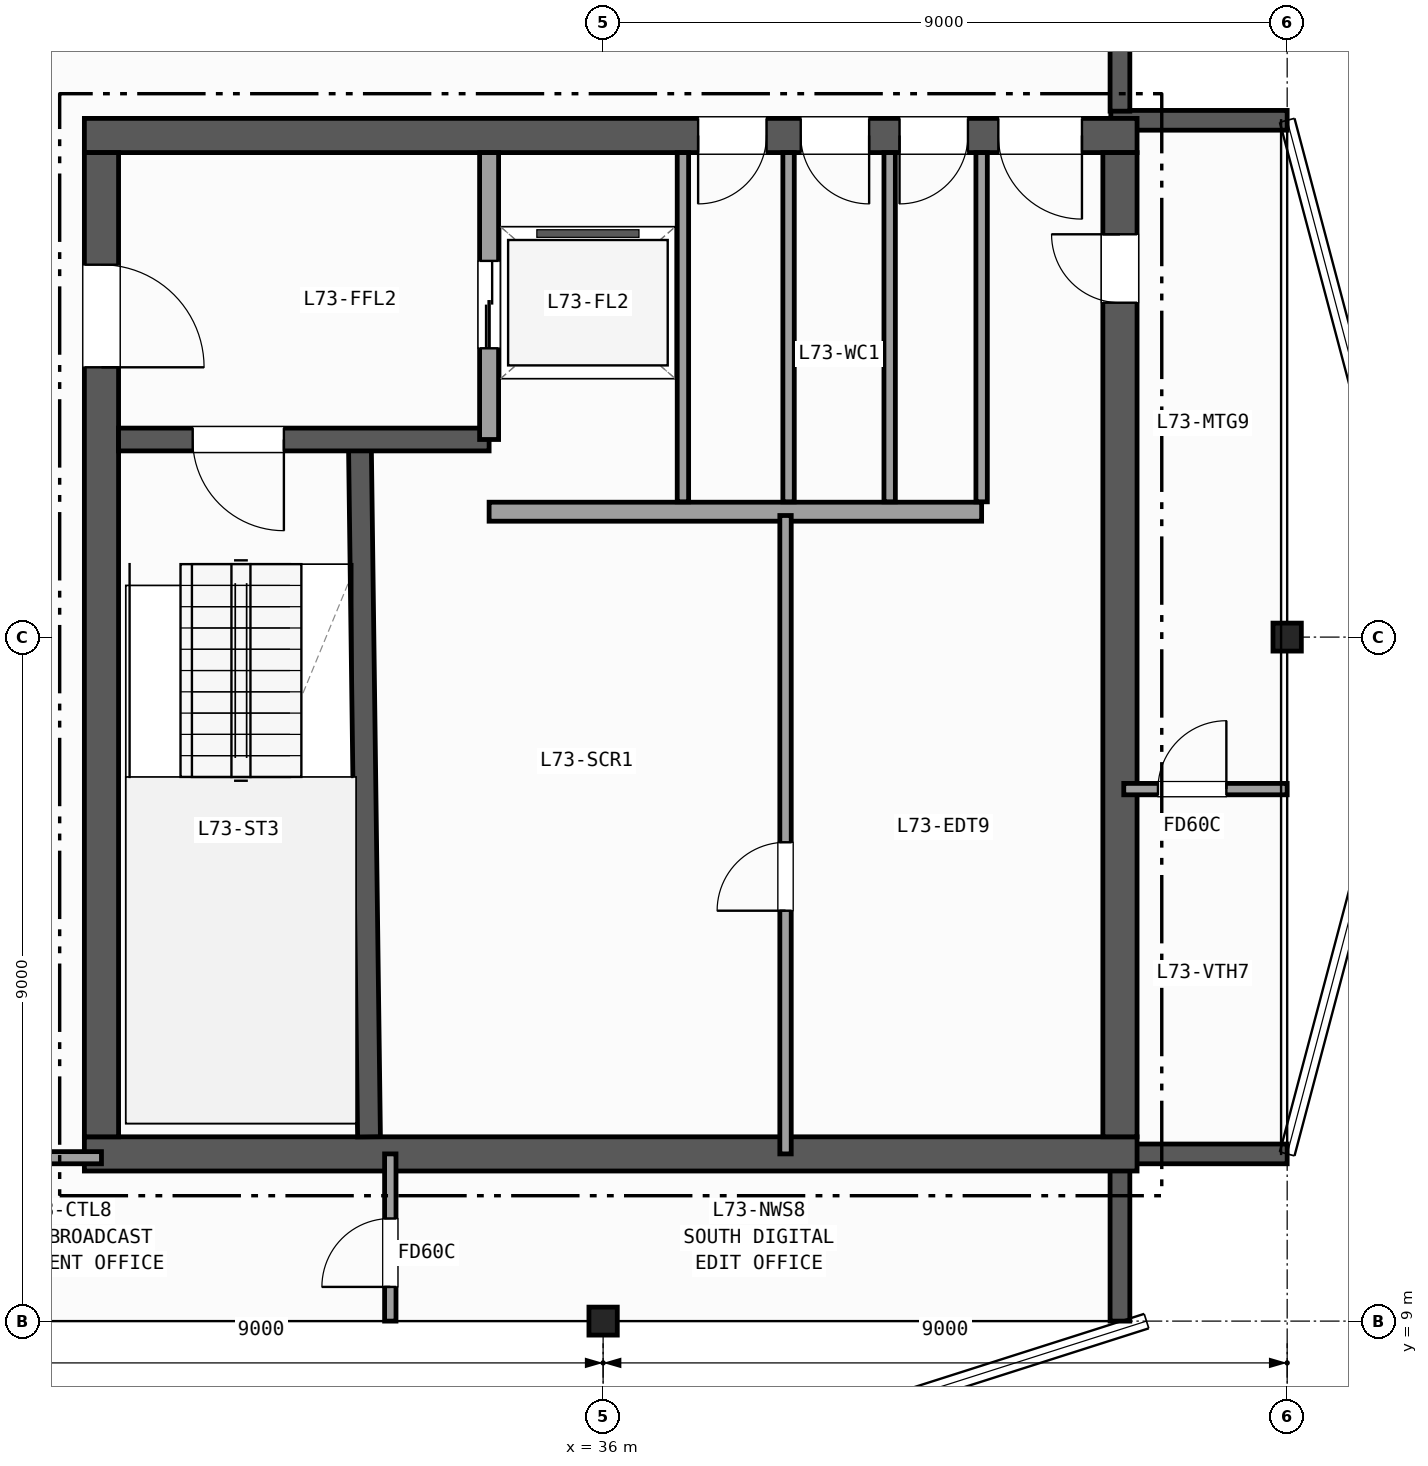
"""IFC4 building model, lengths in metres.
Left out: names, types, materials, properties, quantities, classifications, styles, units other than length and angle.
Written with IfcOpenShell. Run it as: python <this file> out.ifc"""

import sys

from ifc_helpers import new_model, si_unit, direction, frame, frame_2d, origin, origin_2d, place, context, subcontext, project, spatial, rectangle, i_section, extrude, element, fill, save


model = new_model("IFC4")
c1 = context("Model", 3, precision=1e-05, world=origin(), true_north=direction((0.0, 1.0)))
c2 = subcontext(c1, "Body", "Model", "MODEL_VIEW")
j1 = project(units=[si_unit("LENGTHUNIT", "METRE"), si_unit("PLANEANGLEUNIT", "RADIAN")], contexts=[c1])
p1 = place(None, origin())
s1 = spatial("IfcSite", under=j1, at=p1, CompositionType="ELEMENT")
p2 = place(p1, origin())
s2 = spatial("IfcBuilding", under=s1, at=p2, CompositionType="ELEMENT")
p3 = place(p2, frame((0.0, 0.0, 290.0)))
s3 = spatial("IfcBuildingStorey", under=s2, at=p3, CompositionType="ELEMENT", Elevation=290.0)
for number, where, z_axis, x_axis in (
    (1, (36.0, 9.0, 0.0), (0.0, 0.0, 1.0), (1.0, 0.0, 0.0)),
    (2, (45.0, 18.0, 0.0), (0.0, 0.0, 1.0), (1.0, 0.0, 0.0)),
):
    element("IfcColumn", number, at=place(p3, frame(where, z_axis=z_axis, x_axis=x_axis)), inside=s3, PredefinedType="COLUMN", context=c2, shape_type="SweptSolid", body=[
        extrude(i_section(OverallWidth=0.373, OverallDepth=0.368, WebThickness=0.015, FlangeThickness=0.024, FilletRadius=0.015, at=origin_2d()), origin(), (0.0, 0.0, 1.0), 3.7),
    ])
p4 = place(p3, frame((42.8, 9.0, 0.0), z_axis=(0.0, 0.0, 1.0), x_axis=(0.0, 1.0, 0.0)))
e3 = element("IfcWall", 3, at=p4, inside=s3, PredefinedType="SOLIDWALL", context=c2, shape_type="SweptSolid", body=[
    extrude(rectangle(XDim=2.08, YDim=0.26, at=frame_2d((1.04, 0.0))), origin(), (0.0, 0.0, 1.0), 3.42),
])
for number, where, z_axis, x_axis in (
    (4, (42.68, 11.2, 0.0), (0.0, 0.0, 1.0), (1.0, 0.0, 0.0)),
    (5, (45.0, 24.8, 0.0), (0.0, 0.0, 1.0), (-1.0, 0.0, 0.0)),
):
    element("IfcWall", number, at=place(p3, frame(where, z_axis=z_axis, x_axis=x_axis)), inside=s3, PredefinedType="SOLIDWALL", context=c2, shape_type="SweptSolid", body=[
        extrude(rectangle(XDim=2.32, YDim=0.26, at=frame_2d((1.16, 0.0))), origin(), (0.0, 0.0, 1.0), 3.42),
    ])
p5 = place(p3, frame((42.8, 24.92, 0.0), z_axis=(0.0, 0.0, 1.0), x_axis=(0.0, 1.0, 0.0)))
e6 = element("IfcWall", 6, at=p5, inside=s3, PredefinedType="SOLIDWALL", context=c2, shape_type="SweptSolid", body=[
    extrude(rectangle(XDim=2.08, YDim=0.26, at=frame_2d((1.04, 0.0))), origin(), (0.0, 0.0, 1.0), 3.42),
])
p6 = place(p3, frame((29.175, 11.2, 0.0), z_axis=(0.0, 0.0, 1.0), x_axis=(1.0, 0.0, 0.0)))
e7 = element("IfcWall", 7, at=p6, inside=s3, PredefinedType="SHEAR", context=c2, shape_type="SweptSolid", body=[
    extrude(rectangle(XDim=13.85, YDim=0.45, at=frame_2d((6.925, 0.0))), origin(), (0.0, 0.0, 1.0), 3.42),
])
p7 = place(p3, frame((43.025, 24.6, 0.0), z_axis=(0.0, 0.0, 1.0), x_axis=(-1.0, 0.0, 0.0)))
e8 = element("IfcWall", 8, at=p7, inside=s3, PredefinedType="SHEAR", context=c2, shape_type="SweptSolid", body=[
    extrude(rectangle(XDim=13.85, YDim=0.45, at=frame_2d((6.925, 0.0))), origin(), (0.0, 0.0, 1.0), 3.42),
])
p8 = place(p7, frame((0.725, 0.0, 0.0)))
e9 = element("IfcOpeningElement", 9, at=p8, cuts=e8, PredefinedType="OPENING", context=c2, shape_type="SweptSolid", body=[
    extrude(rectangle(XDim=1.1, YDim=2.15, at=frame_2d((0.55, 1.075))), frame((0.0, 0.235, 0.0), z_axis=(0.0, -1.0, 0.0), x_axis=(1.0, 0.0, 0.0)), (0.0, 0.0, 1.0), 0.47),
])
p9 = place(p7, frame((2.225, 0.0, 0.0)))
e10 = element("IfcOpeningElement", 10, at=p9, cuts=e8, PredefinedType="OPENING", context=c2, shape_type="SweptSolid", body=[
    extrude(rectangle(XDim=0.9, YDim=2.1, at=frame_2d((0.45, 1.05))), frame((0.0, 0.235, 0.0), z_axis=(0.0, -1.0, 0.0), x_axis=(1.0, 0.0, 0.0)), (0.0, 0.0, 1.0), 0.47),
])
p10 = place(p7, frame((3.525, 0.0, 0.0)))
e11 = element("IfcOpeningElement", 11, at=p10, cuts=e8, PredefinedType="OPENING", context=c2, shape_type="SweptSolid", body=[
    extrude(rectangle(XDim=0.9, YDim=2.1, at=frame_2d((0.45, 1.05))), frame((0.0, 0.235, 0.0), z_axis=(0.0, -1.0, 0.0), x_axis=(1.0, 0.0, 0.0)), (0.0, 0.0, 1.0), 0.47),
])
p11 = place(p7, frame((4.875, 0.0, 0.0)))
e12 = element("IfcOpeningElement", 12, at=p11, cuts=e8, PredefinedType="OPENING", context=c2, shape_type="SweptSolid", body=[
    extrude(rectangle(XDim=0.9, YDim=2.1, at=frame_2d((0.45, 1.05))), frame((0.0, 0.235, 0.0), z_axis=(0.0, -1.0, 0.0), x_axis=(1.0, 0.0, 0.0)), (0.0, 0.0, 1.0), 0.47),
])
p12 = place(p3, frame((29.4, 24.375, 0.0), z_axis=(0.0, 0.0, 1.0), x_axis=(0.0, -1.0, 0.0)))
e13 = element("IfcWall", 13, at=p12, inside=s3, PredefinedType="SHEAR", context=c2, shape_type="SweptSolid", body=[
    extrude(rectangle(XDim=12.95, YDim=0.45, at=frame_2d((6.475, 0.0))), origin(), (0.0, 0.0, 1.0), 3.42),
])
p13 = place(p12, frame((1.475, 0.0, 0.0)))
e14 = element("IfcOpeningElement", 14, at=p13, cuts=e13, PredefinedType="OPENING", context=c2, shape_type="SweptSolid", body=[
    extrude(rectangle(XDim=1.35, YDim=2.15, at=frame_2d((0.675, 1.075))), frame((0.0, 0.235, 0.0), z_axis=(0.0, -1.0, 0.0), x_axis=(1.0, 0.0, 0.0)), (0.0, 0.0, 1.0), 0.47),
])
p14 = place(p3, frame((42.8, 11.425, 0.0), z_axis=(0.0, 0.0, 1.0), x_axis=(0.0, 1.0, 0.0)))
e15 = element("IfcWall", 15, at=p14, inside=s3, PredefinedType="SHEAR", context=c2, shape_type="SweptSolid", body=[
    extrude(rectangle(XDim=12.95, YDim=0.45, at=frame_2d((6.475, 0.0))), origin(), (0.0, 0.0, 1.0), 3.42),
])
p15 = place(p14, frame((10.975, 0.0, 0.0)))
e16 = element("IfcOpeningElement", 16, at=p15, cuts=e15, PredefinedType="OPENING", context=c2, shape_type="SweptSolid", body=[
    extrude(rectangle(XDim=0.9, YDim=2.1, at=frame_2d((0.45, 1.05))), frame((0.0, 0.235, 0.0), z_axis=(0.0, -1.0, 0.0), x_axis=(1.0, 0.0, 0.0)), (0.0, 0.0, 1.0), 0.47),
])
p16 = place(p3, frame((32.92, 11.425, 0.0), z_axis=(0.0, 0.0, 1.0), x_axis=(-0.013135638869, 0.999913723774, 0.0)))
e17 = element("IfcWall", 17, at=p16, inside=s3, PredefinedType="SHEAR", context=c2, shape_type="SweptSolid", body=[
    extrude(rectangle(XDim=9.126, YDim=0.3, at=frame_2d((4.563, 0.0))), origin(), (0.0, 0.0, 1.0), 3.42),
])
p17 = place(p3, frame((34.5, 20.6, 0.0), z_axis=(0.0, 0.0, 1.0), x_axis=(-1.0, 0.0, 0.0)))
e18 = element("IfcWall", 18, at=p17, inside=s3, PredefinedType="SHEAR", context=c2, shape_type="SweptSolid", body=[
    extrude(rectangle(XDim=4.875, YDim=0.3, at=frame_2d((2.438, 0.0))), origin(), (0.0, 0.0, 1.0), 3.42),
])
p18 = place(p17, frame((2.7, 0.0, 0.0)))
e19 = element("IfcOpeningElement", 19, at=p18, cuts=e18, PredefinedType="OPENING", context=c2, shape_type="SweptSolid", body=[
    extrude(rectangle(XDim=1.2, YDim=2.15, at=frame_2d((0.6, 1.075))), frame((0.0, 0.16, 0.0), z_axis=(0.0, -1.0, 0.0), x_axis=(1.0, 0.0, 0.0)), (0.0, 0.0, 1.0), 0.32),
])
p19 = place(p3, frame((34.5, 20.6, 0.0), z_axis=(0.0, 0.0, 1.0), x_axis=(0.0, 1.0, 0.0)))
e20 = element("IfcWall", 20, at=p19, inside=s3, PredefinedType="PARTITIONING", context=c2, shape_type="SweptSolid", body=[
    extrude(rectangle(XDim=3.775, YDim=0.25, at=frame_2d((1.887, 0.0))), origin(), (0.0, 0.0, 1.0), 3.42),
])
p20 = place(p19, frame((1.2, 0.0, 0.0)))
e21 = element("IfcOpeningElement", 21, at=p20, cuts=e20, PredefinedType="OPENING", context=c2, shape_type="SweptSolid", body=[
    extrude(rectangle(XDim=1.15, YDim=2.15, at=frame_2d((0.575, 1.075))), frame((0.0, 0.135, 0.0), z_axis=(0.0, -1.0, 0.0), x_axis=(1.0, 0.0, 0.0)), (0.0, 0.0, 1.0), 0.27),
])
p21 = place(p3, frame((34.5, 19.65, 0.0), z_axis=(0.0, 0.0, 1.0), x_axis=(1.0, 0.0, 0.0)))
e22 = element("IfcWall", 22, at=p21, inside=s3, PredefinedType="PARTITIONING", context=c2, shape_type="SweptSolid", body=[
    extrude(rectangle(XDim=6.48, YDim=0.25, at=frame_2d((3.24, 0.0))), origin(), (0.0, 0.0, 1.0), 3.42),
])
p22 = place(p3, frame((38.4, 11.2, 0.0), z_axis=(0.0, 0.0, 1.0), x_axis=(0.0, 1.0, 0.0)))
e23 = element("IfcWall", 23, at=p22, inside=s3, PredefinedType="PARTITIONING", context=c2, shape_type="SweptSolid", body=[
    extrude(rectangle(XDim=8.4, YDim=0.15, at=frame_2d((4.2, 0.0))), origin(), (0.0, 0.0, 1.0), 3.42),
])
p23 = place(p22, frame((3.2, 0.0, 0.0)))
e24 = element("IfcOpeningElement", 24, at=p23, cuts=e23, PredefinedType="OPENING", context=c2, shape_type="SweptSolid", body=[
    extrude(rectangle(XDim=0.9, YDim=2.1, at=frame_2d((0.45, 1.05))), frame((0.0, 0.085, 0.0), z_axis=(0.0, -1.0, 0.0), x_axis=(1.0, 0.0, 0.0)), (0.0, 0.0, 1.0), 0.17),
])
for number, where, z_axis, x_axis in (
    (25, (37.05, 19.78, 0.0), (0.0, 0.0, 1.0), (0.0, 1.0, 0.0)),
    (26, (38.44, 19.78, 0.0), (0.0, 0.0, 1.0), (0.0, 1.0, 0.0)),
    (27, (39.77, 19.78, 0.0), (0.0, 0.0, 1.0), (0.0, 1.0, 0.0)),
    (28, (40.98, 19.78, 0.0), (0.0, 0.0, 1.0), (0.0, 1.0, 0.0)),
):
    element("IfcWall", number, at=place(p3, frame(where, z_axis=z_axis, x_axis=x_axis)), inside=s3, PredefinedType="PARTITIONING", context=c2, shape_type="SweptSolid", body=[
        extrude(rectangle(XDim=4.595, YDim=0.15, at=frame_2d((2.297, 0.0))), origin(), (0.0, 0.0, 1.0), 3.42),
    ])
p24 = place(p3, frame((24.65, 11.15, 0.0), z_axis=(0.0, 0.0, 1.0), x_axis=(1.0, 0.0, 0.0)))
e29 = element("IfcWall", 29, at=p24, inside=s3, PredefinedType="PARTITIONING", context=c2, shape_type="SweptSolid", body=[
    extrude(rectangle(XDim=4.75, YDim=0.16, at=frame_2d((2.375, 0.0))), origin(), (0.0, 0.0, 1.0), 2.792),
])
p25 = place(p24, frame((1.2, 0.0, 0.0)))
e30 = element("IfcOpeningElement", 30, at=p25, cuts=e29, PredefinedType="OPENING", context=c2, shape_type="SweptSolid", body=[
    extrude(rectangle(XDim=1.0, YDim=2.1, at=frame_2d((0.5, 1.05))), frame((0.0, 0.09, 0.0), z_axis=(0.0, -1.0, 0.0), x_axis=(1.0, 0.0, 0.0)), (0.0, 0.0, 1.0), 0.18),
])
p26 = place(p3, frame((33.2, 9.0, 0.0), z_axis=(0.0, 0.0, 1.0), x_axis=(0.0, 1.0, 0.0)))
e31 = element("IfcWall", 31, at=p26, inside=s3, PredefinedType="PARTITIONING", context=c2, shape_type="SweptSolid", body=[
    extrude(rectangle(XDim=2.2, YDim=0.15, at=frame_2d((1.1, 0.0))), origin(), (0.0, 0.0, 1.0), 2.707),
])
p27 = place(p26, frame((0.45, 0.0, 0.0)))
e32 = element("IfcOpeningElement", 32, at=p27, cuts=e31, PredefinedType="OPENING", context=c2, shape_type="SweptSolid", body=[
    extrude(rectangle(XDim=0.9, YDim=2.1, at=frame_2d((0.45, 1.05))), frame((0.0, 0.085, 0.0), z_axis=(0.0, -1.0, 0.0), x_axis=(1.0, 0.0, 0.0)), (0.0, 0.0, 1.0), 0.17),
])
p28 = place(p3, frame((42.85, 16.0, 0.0), z_axis=(0.0, 0.0, 1.0), x_axis=(1.0, 0.0, 0.0)))
e33 = element("IfcWall", 33, at=p28, inside=s3, PredefinedType="PARTITIONING", context=c2, shape_type="SweptSolid", body=[
    extrude(rectangle(XDim=2.15, YDim=0.15, at=frame_2d((1.075, 0.0))), origin(), (0.0, 0.0, 1.0), 3.42),
])
p29 = place(p28, frame((0.45, 0.0, 0.0)))
e34 = element("IfcOpeningElement", 34, at=p29, cuts=e33, PredefinedType="OPENING", context=c2, shape_type="SweptSolid", body=[
    extrude(rectangle(XDim=0.9, YDim=2.1, at=frame_2d((0.45, 1.05))), frame((0.0, 0.085, 0.0), z_axis=(0.0, -1.0, 0.0), x_axis=(1.0, 0.0, 0.0)), (0.0, 0.0, 1.0), 0.17),
])
p30 = place(p18, origin())
e35 = element("IfcDoor", 35, at=p30, inside=s3, OperationType="SINGLE_SWING_LEFT", PredefinedType="DOOR", context=c2, shape_type="SweptSolid", body=[
    extrude(rectangle(XDim=1.2, YDim=2.15, at=frame_2d((0.6, 1.075))), frame((0.0, 0.025, 0.0), z_axis=(0.0, -1.0, 0.0), x_axis=(1.0, 0.0, 0.0)), (0.0, 0.0, 1.0), 0.05),
])
fill(e19, e35)
p31 = place(p13, origin())
e36 = element("IfcDoor", 36, at=p31, inside=s3, OperationType="SINGLE_SWING_RIGHT", PredefinedType="DOOR", context=c2, shape_type="SweptSolid", body=[
    extrude(rectangle(XDim=1.35, YDim=2.15, at=frame_2d((0.675, 1.075))), frame((0.0, 0.025, 0.0), z_axis=(0.0, -1.0, 0.0), x_axis=(1.0, 0.0, 0.0)), (0.0, 0.0, 1.0), 0.05),
])
fill(e14, e36)
p32 = place(p15, origin())
e37 = element("IfcDoor", 37, at=p32, inside=s3, OperationType="SINGLE_SWING_RIGHT", PredefinedType="DOOR", context=c2, shape_type="SweptSolid", body=[
    extrude(rectangle(XDim=0.9, YDim=2.1, at=frame_2d((0.45, 1.05))), frame((0.0, 0.025, 0.0), z_axis=(0.0, -1.0, 0.0), x_axis=(1.0, 0.0, 0.0)), (0.0, 0.0, 1.0), 0.05),
])
fill(e16, e37)
p33 = place(p8, origin())
e38 = element("IfcDoor", 38, at=p33, inside=s3, OperationType="SINGLE_SWING_LEFT", PredefinedType="DOOR", context=c2, shape_type="SweptSolid", body=[
    extrude(rectangle(XDim=1.1, YDim=2.15, at=frame_2d((0.55, 1.075))), frame((0.0, 0.025, 0.0), z_axis=(0.0, -1.0, 0.0), x_axis=(1.0, 0.0, 0.0)), (0.0, 0.0, 1.0), 0.05),
])
fill(e9, e38)
p34 = place(p9, origin())
e39 = element("IfcDoor", 39, at=p34, inside=s3, OperationType="SINGLE_SWING_RIGHT", PredefinedType="DOOR", context=c2, shape_type="SweptSolid", body=[
    extrude(rectangle(XDim=0.9, YDim=2.1, at=frame_2d((0.45, 1.05))), frame((0.0, 0.025, 0.0), z_axis=(0.0, -1.0, 0.0), x_axis=(1.0, 0.0, 0.0)), (0.0, 0.0, 1.0), 0.05),
])
fill(e10, e39)
p35 = place(p10, origin())
e40 = element("IfcDoor", 40, at=p35, inside=s3, OperationType="SINGLE_SWING_LEFT", PredefinedType="DOOR", context=c2, shape_type="SweptSolid", body=[
    extrude(rectangle(XDim=0.9, YDim=2.1, at=frame_2d((0.45, 1.05))), frame((0.0, 0.025, 0.0), z_axis=(0.0, -1.0, 0.0), x_axis=(1.0, 0.0, 0.0)), (0.0, 0.0, 1.0), 0.05),
])
fill(e11, e40)
p36 = place(p11, origin())
e41 = element("IfcDoor", 41, at=p36, inside=s3, OperationType="SINGLE_SWING_RIGHT", PredefinedType="DOOR", context=c2, shape_type="SweptSolid", body=[
    extrude(rectangle(XDim=0.9, YDim=2.1, at=frame_2d((0.45, 1.05))), frame((0.0, 0.025, 0.0), z_axis=(0.0, -1.0, 0.0), x_axis=(1.0, 0.0, 0.0)), (0.0, 0.0, 1.0), 0.05),
])
fill(e12, e41)
p37 = place(p20, origin())
e42 = element("IfcDoor", 42, at=p37, inside=s3, OperationType="DOUBLE_DOOR_SLIDING", PredefinedType="DOOR", context=c2, shape_type="SweptSolid", body=[
    extrude(rectangle(XDim=1.15, YDim=2.15, at=frame_2d((0.575, 1.075))), frame((0.0, 0.025, 0.0), z_axis=(0.0, -1.0, 0.0), x_axis=(1.0, 0.0, 0.0)), (0.0, 0.0, 1.0), 0.05),
])
fill(e21, e42)
p38 = place(p23, origin())
e43 = element("IfcDoor", 43, at=p38, inside=s3, OperationType="SINGLE_SWING_LEFT", PredefinedType="DOOR", context=c2, shape_type="SweptSolid", body=[
    extrude(rectangle(XDim=0.9, YDim=2.1, at=frame_2d((0.45, 1.05))), frame((0.0, 0.025, 0.0), z_axis=(0.0, -1.0, 0.0), x_axis=(1.0, 0.0, 0.0)), (0.0, 0.0, 1.0), 0.05),
])
fill(e24, e43)
p39 = place(p27, origin())
e44 = element("IfcDoor", 44, at=p39, inside=s3, OperationType="SINGLE_SWING_LEFT", PredefinedType="DOOR", context=c2, shape_type="SweptSolid", body=[
    extrude(rectangle(XDim=0.9, YDim=2.1, at=frame_2d((0.45, 1.05))), frame((0.0, 0.025, 0.0), z_axis=(0.0, -1.0, 0.0), x_axis=(1.0, 0.0, 0.0)), (0.0, 0.0, 1.0), 0.05),
])
fill(e32, e44)
p40 = place(p29, origin())
e45 = element("IfcDoor", 45, at=p40, inside=s3, OperationType="SINGLE_SWING_RIGHT", PredefinedType="DOOR", context=c2, shape_type="SweptSolid", body=[
    extrude(rectangle(XDim=0.9, YDim=2.1, at=frame_2d((0.45, 1.05))), frame((0.0, 0.025, 0.0), z_axis=(0.0, -1.0, 0.0), x_axis=(1.0, 0.0, 0.0)), (0.0, 0.0, 1.0), 0.05),
])
fill(e34, e45)
save(model, sys.argv[1])
